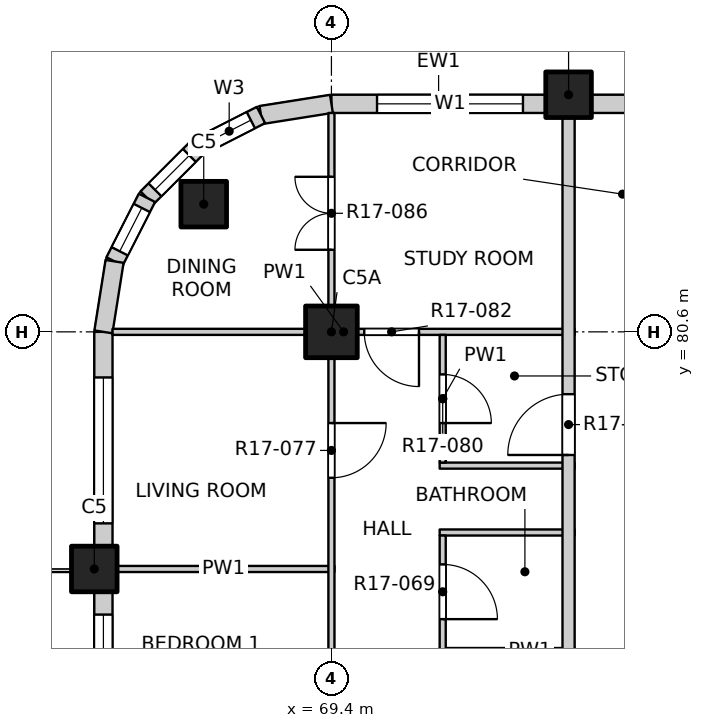
"""IFC4 building model, lengths in metres.
Left out: names, types, materials, properties, quantities, classifications, styles, units other than length and angle.
Written with IfcOpenShell. Run it as: python <this file> out.ifc"""

import sys

from ifc_helpers import new_model, si_unit, direction, frame, frame_2d, origin, origin_2d, place, context, subcontext, project, spatial, rectangle, extrude, element, fill, save


model = new_model("IFC4")
c1 = context("Model", 3, precision=1e-05, world=origin(), true_north=direction((0.0, 1.0)))
c2 = subcontext(c1, "Body", "Model", "MODEL_VIEW")
j1 = project(units=[si_unit("LENGTHUNIT", "METRE"), si_unit("PLANEANGLEUNIT", "RADIAN")], contexts=[c1])
p1 = place(None, origin())
s1 = spatial("IfcSite", under=j1, at=p1, CompositionType="ELEMENT")
p2 = place(p1, origin())
s2 = spatial("IfcBuilding", under=s1, at=p2, CompositionType="ELEMENT")
p3 = place(p2, frame((0.0, 0.0, 182.6)))
s3 = spatial("IfcBuildingStorey", under=s2, at=p3, CompositionType="ELEMENT", Elevation=182.6)
for number, where, z_axis, x_axis in (
    (1, (67.3, 82.7, -0.25), (0.0, 0.0, 1.0), (1.0, 0.0, 0.0)),
    (2, (73.3, 84.5, -0.25), (0.0, 0.0, 1.0), (1.0, 0.0, 0.0)),
    (3, (65.5, 76.7, -0.25), (0.0, 0.0, 1.0), (1.0, 0.0, 0.0)),
):
    element("IfcColumn", number, at=place(p3, frame(where, z_axis=z_axis, x_axis=x_axis)), inside=s3, PredefinedType="COLUMN", context=c2, shape_type="SweptSolid", body=[
        extrude(rectangle(XDim=0.75, YDim=0.75, at=origin_2d()), origin(), (0.0, 0.0, 1.0), 3.4),
    ])
p4 = place(p3, frame((69.4, 80.6, -0.25), z_axis=(0.0, 0.0, 1.0), x_axis=(1.0, 0.0, 0.0)))
e4 = element("IfcColumn", 4, at=p4, inside=s3, PredefinedType="COLUMN", context=c2, shape_type="SweptSolid", body=[
    extrude(rectangle(XDim=0.85, YDim=0.85, at=origin_2d()), origin(), (0.0, 0.0, 1.0), 3.4),
])
p5 = place(p3, frame((69.4, 84.35, 0.0), z_axis=(0.0, 0.0, 1.0), x_axis=(1.0, 0.0, 0.0)))
e5 = element("IfcWall", 5, at=p5, inside=s3, PredefinedType="SOLIDWALL", context=c2, shape_type="SweptSolid", body=[
    extrude(rectangle(XDim=3.525, YDim=0.3, at=frame_2d((1.763, 0.0))), origin(), (0.0, 0.0, 1.0), 2.7),
])
p6 = place(p5, frame((0.75, 0.0, 0.9)))
e6 = element("IfcOpeningElement", 6, at=p6, cuts=e5, PredefinedType="OPENING", context=c2, shape_type="SweptSolid", body=[
    extrude(rectangle(XDim=2.4, YDim=1.8, at=frame_2d((1.2, 0.9))), frame((0.0, 0.16, 0.0), z_axis=(0.0, -1.0, 0.0), x_axis=(1.0, 0.0, 0.0)), (0.0, 0.0, 1.0), 0.32),
])
p7 = place(p3, frame((73.675, 84.35, 0.0), z_axis=(0.0, 0.0, 1.0), x_axis=(1.0, 0.0, 0.0)))
e7 = element("IfcWall", 7, at=p7, inside=s3, PredefinedType="SOLIDWALL", context=c2, shape_type="SweptSolid", body=[
    extrude(rectangle(XDim=1.3, YDim=0.3, at=frame_2d((0.65, 0.0))), origin(), (0.0, 0.0, 1.0), 2.7),
])
p8 = place(p3, frame((65.65, 69.275, 0.0), z_axis=(0.0, 0.0, 1.0), x_axis=(0.0, 1.0, 0.0)))
e8 = element("IfcWall", 8, at=p8, inside=s3, PredefinedType="SOLIDWALL", context=c2, shape_type="SweptSolid", body=[
    extrude(rectangle(XDim=7.05, YDim=0.3, at=frame_2d((3.525, 0.0))), origin(), (0.0, 0.0, 1.0), 2.7),
])
p9 = place(p8, frame((0.675, 0.0, 0.0)))
e9 = element("IfcOpeningElement", 9, at=p9, cuts=e8, PredefinedType="OPENING", context=c2, shape_type="SweptSolid", body=[
    extrude(rectangle(XDim=1.8, YDim=2.4, at=frame_2d((0.9, 1.2))), frame((0.0, 0.16, 0.0), z_axis=(0.0, -1.0, 0.0), x_axis=(1.0, 0.0, 0.0)), (0.0, 0.0, 1.0), 0.32),
])
p10 = place(p8, frame((4.275, 0.0, 0.9)))
e10 = element("IfcOpeningElement", 10, at=p10, cuts=e8, PredefinedType="OPENING", context=c2, shape_type="SweptSolid", body=[
    extrude(rectangle(XDim=2.4, YDim=1.8, at=frame_2d((1.2, 0.9))), frame((0.0, 0.16, 0.0), z_axis=(0.0, -1.0, 0.0), x_axis=(1.0, 0.0, 0.0)), (0.0, 0.0, 1.0), 0.32),
])
p11 = place(p3, frame((65.65, 77.075, 0.0), z_axis=(0.0, 0.0, 1.0), x_axis=(0.0, 1.0, 0.0)))
e11 = element("IfcWall", 11, at=p11, inside=s3, PredefinedType="SOLIDWALL", context=c2, shape_type="SweptSolid", body=[
    extrude(rectangle(XDim=3.525, YDim=0.3, at=frame_2d((1.763, 0.0))), origin(), (0.0, 0.0, 1.0), 2.7),
])
p12 = place(p11, frame((0.375, 0.0, 0.9)))
e12 = element("IfcOpeningElement", 12, at=p12, cuts=e11, PredefinedType="OPENING", context=c2, shape_type="SweptSolid", body=[
    extrude(rectangle(XDim=2.4, YDim=1.8, at=frame_2d((1.2, 0.9))), frame((0.0, 0.16, 0.0), z_axis=(0.0, -1.0, 0.0), x_axis=(1.0, 0.0, 0.0)), (0.0, 0.0, 1.0), 0.32),
])
p13 = place(p3, frame((69.4, 84.35, 0.0), z_axis=(0.0, 0.0, 1.0), x_axis=(-0.987678452879, -0.156496880861, 0.0)))
e13 = element("IfcWall", 13, at=p13, inside=s3, PredefinedType="SOLIDWALL", context=c2, shape_type="SweptSolid", body=[
    extrude(rectangle(XDim=1.173, YDim=0.3, at=frame_2d((0.586, 0.0))), origin(), (0.0, 0.0, 1.0), 2.7),
])
p14 = place(p3, frame((68.241, 84.167, 0.0), z_axis=(0.0, 0.0, 1.0), x_axis=(-0.890988677504, -0.454025524128, 0.0)))
e14 = element("IfcWall", 14, at=p14, inside=s3, PredefinedType="SOLIDWALL", context=c2, shape_type="SweptSolid", body=[
    extrude(rectangle(XDim=1.173, YDim=0.3, at=frame_2d((0.587, 0.0))), origin(), (0.0, 0.0, 1.0), 2.7),
])
p15 = place(p14, frame((0.187, 0.0, 0.9)))
e15 = element("IfcOpeningElement", 15, at=p15, cuts=e14, PredefinedType="OPENING", context=c2, shape_type="SweptSolid", body=[
    extrude(rectangle(XDim=0.8, YDim=1.2, at=frame_2d((0.4, 0.6))), frame((0.0, 0.16, 0.0), z_axis=(0.0, -1.0, 0.0), x_axis=(1.0, 0.0, 0.0)), (0.0, 0.0, 1.0), 0.32),
])
p16 = place(p3, frame((67.196, 83.634, 0.0), z_axis=(0.0, 0.0, 1.0), x_axis=(-0.707106781187, -0.707106781187, 0.0)))
e16 = element("IfcWall", 16, at=p16, inside=s3, PredefinedType="SOLIDWALL", context=c2, shape_type="SweptSolid", body=[
    extrude(rectangle(XDim=1.173, YDim=0.3, at=frame_2d((0.586, 0.0))), origin(), (0.0, 0.0, 1.0), 2.7),
])
p17 = place(p16, frame((0.187, 0.0, 0.9)))
e17 = element("IfcOpeningElement", 17, at=p17, cuts=e16, PredefinedType="OPENING", context=c2, shape_type="SweptSolid", body=[
    extrude(rectangle(XDim=0.8, YDim=1.2, at=frame_2d((0.4, 0.6))), frame((0.0, 0.16, 0.0), z_axis=(0.0, -1.0, 0.0), x_axis=(1.0, 0.0, 0.0)), (0.0, 0.0, 1.0), 0.32),
])
p18 = place(p3, frame((66.366, 82.804, 0.0), z_axis=(0.0, 0.0, 1.0), x_axis=(-0.454025524128, -0.890988677504, 0.0)))
e18 = element("IfcWall", 18, at=p18, inside=s3, PredefinedType="SOLIDWALL", context=c2, shape_type="SweptSolid", body=[
    extrude(rectangle(XDim=1.173, YDim=0.3, at=frame_2d((0.587, 0.0))), origin(), (0.0, 0.0, 1.0), 2.7),
])
p19 = place(p18, frame((0.187, 0.0, 0.9)))
e19 = element("IfcOpeningElement", 19, at=p19, cuts=e18, PredefinedType="OPENING", context=c2, shape_type="SweptSolid", body=[
    extrude(rectangle(XDim=0.8, YDim=1.2, at=frame_2d((0.4, 0.6))), frame((0.0, 0.16, 0.0), z_axis=(0.0, -1.0, 0.0), x_axis=(1.0, 0.0, 0.0)), (0.0, 0.0, 1.0), 0.32),
])
p20 = place(p3, frame((65.833, 81.759, 0.0), z_axis=(0.0, 0.0, 1.0), x_axis=(-0.156496880861, -0.987678452879, 0.0)))
e20 = element("IfcWall", 20, at=p20, inside=s3, PredefinedType="SOLIDWALL", context=c2, shape_type="SweptSolid", body=[
    extrude(rectangle(XDim=1.173, YDim=0.3, at=frame_2d((0.586, 0.0))), origin(), (0.0, 0.0, 1.0), 2.7),
])
p21 = place(p3, frame((71.18, 75.35, 0.0), z_axis=(0.0, 0.0, 1.0), x_axis=(1.0, 0.0, 0.0)))
e21 = element("IfcWall", 21, at=p21, inside=s3, PredefinedType="PARTITIONING", context=c2, shape_type="SweptSolid", body=[
    extrude(rectangle(XDim=2.22, YDim=0.1, at=frame_2d((1.11, 0.0))), origin(), (0.0, 0.0, 1.0), 3.15),
])
p22 = place(p3, frame((65.8, 76.7, 0.0), z_axis=(0.0, 0.0, 1.0), x_axis=(1.0, 0.0, 0.0)))
e22 = element("IfcWall", 22, at=p22, inside=s3, PredefinedType="PARTITIONING", context=c2, shape_type="SweptSolid", body=[
    extrude(rectangle(XDim=3.65, YDim=0.1, at=frame_2d((1.825, 0.0))), origin(), (0.0, 0.0, 1.0), 2.55),
])
for number, where, z_axis, x_axis in (
    (23, (71.18, 77.3, 0.0), (0.0, 0.0, 1.0), (1.0, 0.0, 0.0)),
    (24, (71.18, 78.4, 0.0), (0.0, 0.0, 1.0), (1.0, 0.0, 0.0)),
):
    element("IfcWall", number, at=place(p3, frame(where, z_axis=z_axis, x_axis=x_axis)), inside=s3, PredefinedType="PARTITIONING", context=c2, shape_type="SweptSolid", body=[
        extrude(rectangle(XDim=2.22, YDim=0.1, at=frame_2d((1.11, 0.0))), origin(), (0.0, 0.0, 1.0), 3.15),
    ])
p23 = place(p3, frame((65.8, 80.6, 0.0), z_axis=(0.0, 0.0, 1.0), x_axis=(1.0, 0.0, 0.0)))
e25 = element("IfcWall", 25, at=p23, inside=s3, PredefinedType="PARTITIONING", context=c2, shape_type="SweptSolid", body=[
    extrude(rectangle(XDim=7.6, YDim=0.1, at=frame_2d((3.8, 0.0))), origin(), (0.0, 0.0, 1.0), 3.15),
])
p24 = place(p23, frame((4.14, 0.0, 0.0)))
e26 = element("IfcOpeningElement", 26, at=p24, cuts=e25, PredefinedType="OPENING", context=c2, shape_type="SweptSolid", body=[
    extrude(rectangle(XDim=0.9, YDim=2.1, at=frame_2d((0.45, 1.05))), frame((0.0, 0.06, 0.0), z_axis=(0.0, -1.0, 0.0), x_axis=(1.0, 0.0, 0.0)), (0.0, 0.0, 1.0), 0.12),
])
p25 = place(p3, frame((69.4, 45.8, 0.0), z_axis=(0.0, 0.0, 1.0), x_axis=(0.0, 1.0, 0.0)))
e27 = element("IfcWall", 27, at=p25, inside=s3, PredefinedType="PARTITIONING", context=c2, shape_type="SweptSolid", body=[
    extrude(rectangle(XDim=38.4, YDim=0.1, at=frame_2d((19.2, 0.0))), origin(), (0.0, 0.0, 1.0), 3.15),
])
p26 = place(p25, frame((1.05, 0.0, 0.0)))
e28 = element("IfcOpeningElement", 28, at=p26, cuts=e27, PredefinedType="OPENING", context=c2, shape_type="SweptSolid", body=[
    extrude(rectangle(XDim=1.2, YDim=2.1, at=frame_2d((0.6, 1.05))), frame((0.0, 0.06, 0.0), z_axis=(0.0, -1.0, 0.0), x_axis=(1.0, 0.0, 0.0)), (0.0, 0.0, 1.0), 0.12),
])
p27 = place(p25, frame((6.9, 0.0, 0.0)))
e29 = element("IfcOpeningElement", 29, at=p27, cuts=e27, PredefinedType="OPENING", context=c2, shape_type="SweptSolid", body=[
    extrude(rectangle(XDim=1.2, YDim=2.1, at=frame_2d((0.6, 1.05))), frame((0.0, 0.06, 0.0), z_axis=(0.0, -1.0, 0.0), x_axis=(1.0, 0.0, 0.0)), (0.0, 0.0, 1.0), 0.12),
])
p28 = place(p25, frame((12.9, 0.0, 0.0)))
e30 = element("IfcOpeningElement", 30, at=p28, cuts=e27, PredefinedType="OPENING", context=c2, shape_type="SweptSolid", body=[
    extrude(rectangle(XDim=0.9, YDim=2.1, at=frame_2d((0.45, 1.05))), frame((0.0, 0.06, 0.0), z_axis=(0.0, -1.0, 0.0), x_axis=(1.0, 0.0, 0.0)), (0.0, 0.0, 1.0), 0.12),
])
p29 = place(p25, frame((16.8, 0.0, 0.0)))
e31 = element("IfcOpeningElement", 31, at=p29, cuts=e27, PredefinedType="OPENING", context=c2, shape_type="SweptSolid", body=[
    extrude(rectangle(XDim=0.9, YDim=2.1, at=frame_2d((0.45, 1.05))), frame((0.0, 0.06, 0.0), z_axis=(0.0, -1.0, 0.0), x_axis=(1.0, 0.0, 0.0)), (0.0, 0.0, 1.0), 0.12),
])
p30 = place(p25, frame((20.7, 0.0, 0.0)))
e32 = element("IfcOpeningElement", 32, at=p30, cuts=e27, PredefinedType="OPENING", context=c2, shape_type="SweptSolid", body=[
    extrude(rectangle(XDim=0.9, YDim=2.1, at=frame_2d((0.45, 1.05))), frame((0.0, 0.06, 0.0), z_axis=(0.0, -1.0, 0.0), x_axis=(1.0, 0.0, 0.0)), (0.0, 0.0, 1.0), 0.12),
])
p31 = place(p25, frame((24.6, 0.0, 0.0)))
e33 = element("IfcOpeningElement", 33, at=p31, cuts=e27, PredefinedType="OPENING", context=c2, shape_type="SweptSolid", body=[
    extrude(rectangle(XDim=0.9, YDim=2.1, at=frame_2d((0.45, 1.05))), frame((0.0, 0.06, 0.0), z_axis=(0.0, -1.0, 0.0), x_axis=(1.0, 0.0, 0.0)), (0.0, 0.0, 1.0), 0.12),
])
p32 = place(p25, frame((28.5, 0.0, 0.0)))
e34 = element("IfcOpeningElement", 34, at=p32, cuts=e27, PredefinedType="OPENING", context=c2, shape_type="SweptSolid", body=[
    extrude(rectangle(XDim=0.9, YDim=2.1, at=frame_2d((0.45, 1.05))), frame((0.0, 0.06, 0.0), z_axis=(0.0, -1.0, 0.0), x_axis=(1.0, 0.0, 0.0)), (0.0, 0.0, 1.0), 0.12),
])
p33 = place(p25, frame((32.4, 0.0, 0.0)))
e35 = element("IfcOpeningElement", 35, at=p33, cuts=e27, PredefinedType="OPENING", context=c2, shape_type="SweptSolid", body=[
    extrude(rectangle(XDim=0.9, YDim=2.1, at=frame_2d((0.45, 1.05))), frame((0.0, 0.06, 0.0), z_axis=(0.0, -1.0, 0.0), x_axis=(1.0, 0.0, 0.0)), (0.0, 0.0, 1.0), 0.12),
])
p34 = place(p25, frame((36.15, 0.0, 0.0)))
e36 = element("IfcOpeningElement", 36, at=p34, cuts=e27, PredefinedType="OPENING", context=c2, shape_type="SweptSolid", body=[
    extrude(rectangle(XDim=1.2, YDim=2.1, at=frame_2d((0.6, 1.05))), frame((0.0, 0.06, 0.0), z_axis=(0.0, -1.0, 0.0), x_axis=(1.0, 0.0, 0.0)), (0.0, 0.0, 1.0), 0.12),
])
p35 = place(p3, frame((71.23, 68.2, 0.0), z_axis=(0.0, 0.0, 1.0), x_axis=(0.0, 1.0, 0.0)))
e37 = element("IfcWall", 37, at=p35, inside=s3, PredefinedType="PARTITIONING", context=c2, shape_type="SweptSolid", body=[
    extrude(rectangle(XDim=9.05, YDim=0.1, at=frame_2d((4.525, 0.0))), origin(), (0.0, 0.0, 1.0), 3.15),
])
p36 = place(p35, frame((0.55, 0.0, 0.0)))
e38 = element("IfcOpeningElement", 38, at=p36, cuts=e37, PredefinedType="OPENING", context=c2, shape_type="SweptSolid", body=[
    extrude(rectangle(XDim=0.8, YDim=2.1, at=frame_2d((0.4, 1.05))), frame((0.0, 0.06, 0.0), z_axis=(0.0, -1.0, 0.0), x_axis=(1.0, 0.0, 0.0)), (0.0, 0.0, 1.0), 0.12),
])
p37 = place(p35, frame((2.825, 0.0, 0.0)))
e39 = element("IfcOpeningElement", 39, at=p37, cuts=e37, PredefinedType="OPENING", context=c2, shape_type="SweptSolid", body=[
    extrude(rectangle(XDim=0.9, YDim=2.1, at=frame_2d((0.45, 1.05))), frame((0.0, 0.06, 0.0), z_axis=(0.0, -1.0, 0.0), x_axis=(1.0, 0.0, 0.0)), (0.0, 0.0, 1.0), 0.12),
])
p38 = place(p35, frame((5.425, 0.0, 0.0)))
e40 = element("IfcOpeningElement", 40, at=p38, cuts=e37, PredefinedType="OPENING", context=c2, shape_type="SweptSolid", body=[
    extrude(rectangle(XDim=0.9, YDim=2.1, at=frame_2d((0.45, 1.05))), frame((0.0, 0.06, 0.0), z_axis=(0.0, -1.0, 0.0), x_axis=(1.0, 0.0, 0.0)), (0.0, 0.0, 1.0), 0.12),
])
p39 = place(p35, frame((7.675, 0.0, 0.0)))
e41 = element("IfcOpeningElement", 41, at=p39, cuts=e37, PredefinedType="OPENING", context=c2, shape_type="SweptSolid", body=[
    extrude(rectangle(XDim=0.9, YDim=2.1, at=frame_2d((0.45, 1.05))), frame((0.0, 0.06, 0.0), z_axis=(0.0, -1.0, 0.0), x_axis=(1.0, 0.0, 0.0)), (0.0, 0.0, 1.0), 0.12),
])
p40 = place(p3, frame((71.23, 78.45, 0.0), z_axis=(0.0, 0.0, 1.0), x_axis=(0.0, 1.0, 0.0)))
e42 = element("IfcWall", 42, at=p40, inside=s3, PredefinedType="PARTITIONING", context=c2, shape_type="SweptSolid", body=[
    extrude(rectangle(XDim=2.1, YDim=0.1, at=frame_2d((1.05, 0.0))), origin(), (0.0, 0.0, 1.0), 3.15),
])
p41 = place(p40, frame((0.65, 0.0, 0.0)))
e43 = element("IfcOpeningElement", 43, at=p41, cuts=e42, PredefinedType="OPENING", context=c2, shape_type="SweptSolid", body=[
    extrude(rectangle(XDim=0.8, YDim=2.1, at=frame_2d((0.4, 1.05))), frame((0.0, 0.06, 0.0), z_axis=(0.0, -1.0, 0.0), x_axis=(1.0, 0.0, 0.0)), (0.0, 0.0, 1.0), 0.12),
])
p42 = place(p3, frame((73.3, 49.5, 0.0), z_axis=(0.0, 0.0, 1.0), x_axis=(0.0, 1.0, 0.0)))
e44 = element("IfcWall", 44, at=p42, inside=s3, PredefinedType="PARTITIONING", context=c2, shape_type="SweptSolid", body=[
    extrude(rectangle(XDim=34.7, YDim=0.2, at=frame_2d((17.35, 0.0))), origin(), (0.0, 0.0, 1.0), 3.15),
])
p43 = place(p42, frame((10.575, 0.0, 0.0)))
e45 = element("IfcOpeningElement", 45, at=p43, cuts=e44, PredefinedType="OPENING", context=c2, shape_type="SweptSolid", body=[
    extrude(rectangle(XDim=1.0, YDim=2.1, at=frame_2d((0.5, 1.05))), frame((0.0, 0.11, 0.0), z_axis=(0.0, -1.0, 0.0), x_axis=(1.0, 0.0, 0.0)), (0.0, 0.0, 1.0), 0.22),
])
p44 = place(p42, frame((18.825, 0.0, 0.0)))
e46 = element("IfcOpeningElement", 46, at=p44, cuts=e44, PredefinedType="OPENING", context=c2, shape_type="SweptSolid", body=[
    extrude(rectangle(XDim=1.0, YDim=2.1, at=frame_2d((0.5, 1.05))), frame((0.0, 0.11, 0.0), z_axis=(0.0, -1.0, 0.0), x_axis=(1.0, 0.0, 0.0)), (0.0, 0.0, 1.0), 0.22),
])
p45 = place(p42, frame((29.075, 0.0, 0.0)))
e47 = element("IfcOpeningElement", 47, at=p45, cuts=e44, PredefinedType="OPENING", context=c2, shape_type="SweptSolid", body=[
    extrude(rectangle(XDim=1.0, YDim=2.1, at=frame_2d((0.5, 1.05))), frame((0.0, 0.11, 0.0), z_axis=(0.0, -1.0, 0.0), x_axis=(1.0, 0.0, 0.0)), (0.0, 0.0, 1.0), 0.22),
])
p46 = place(p6, origin())
e48 = element("IfcWindow", 48, at=p46, inside=s3, PartitioningType="DOUBLE_PANEL_VERTICAL", PredefinedType="WINDOW", context=c2, shape_type="SweptSolid", body=[
    extrude(rectangle(XDim=2.4, YDim=1.8, at=frame_2d((1.2, 0.9))), frame((0.0, 0.03, 0.0), z_axis=(0.0, -1.0, 0.0), x_axis=(1.0, 0.0, 0.0)), (0.0, 0.0, 1.0), 0.06),
])
fill(e6, e48)
p47 = place(p10, origin())
e49 = element("IfcWindow", 49, at=p47, inside=s3, PartitioningType="DOUBLE_PANEL_VERTICAL", PredefinedType="WINDOW", context=c2, shape_type="SweptSolid", body=[
    extrude(rectangle(XDim=2.4, YDim=1.8, at=frame_2d((1.2, 0.9))), frame((0.0, 0.03, 0.0), z_axis=(0.0, -1.0, 0.0), x_axis=(1.0, 0.0, 0.0)), (0.0, 0.0, 1.0), 0.06),
])
fill(e10, e49)
p48 = place(p12, origin())
e50 = element("IfcWindow", 50, at=p48, inside=s3, PartitioningType="DOUBLE_PANEL_VERTICAL", PredefinedType="WINDOW", context=c2, shape_type="SweptSolid", body=[
    extrude(rectangle(XDim=2.4, YDim=1.8, at=frame_2d((1.2, 0.9))), frame((0.0, 0.03, 0.0), z_axis=(0.0, -1.0, 0.0), x_axis=(1.0, 0.0, 0.0)), (0.0, 0.0, 1.0), 0.06),
])
fill(e12, e50)
p49 = place(p15, origin())
e51 = element("IfcWindow", 51, at=p49, inside=s3, PartitioningType="SINGLE_PANEL", PredefinedType="WINDOW", context=c2, shape_type="SweptSolid", body=[
    extrude(rectangle(XDim=0.8, YDim=1.2, at=frame_2d((0.4, 0.6))), frame((0.0, 0.03, 0.0), z_axis=(0.0, -1.0, 0.0), x_axis=(1.0, 0.0, 0.0)), (0.0, 0.0, 1.0), 0.06),
])
fill(e15, e51)
p50 = place(p17, origin())
e52 = element("IfcWindow", 52, at=p50, inside=s3, PartitioningType="SINGLE_PANEL", PredefinedType="WINDOW", context=c2, shape_type="SweptSolid", body=[
    extrude(rectangle(XDim=0.8, YDim=1.2, at=frame_2d((0.4, 0.6))), frame((0.0, 0.03, 0.0), z_axis=(0.0, -1.0, 0.0), x_axis=(1.0, 0.0, 0.0)), (0.0, 0.0, 1.0), 0.06),
])
fill(e17, e52)
p51 = place(p19, origin())
e53 = element("IfcWindow", 53, at=p51, inside=s3, PartitioningType="SINGLE_PANEL", PredefinedType="WINDOW", context=c2, shape_type="SweptSolid", body=[
    extrude(rectangle(XDim=0.8, YDim=1.2, at=frame_2d((0.4, 0.6))), frame((0.0, 0.03, 0.0), z_axis=(0.0, -1.0, 0.0), x_axis=(1.0, 0.0, 0.0)), (0.0, 0.0, 1.0), 0.06),
])
fill(e19, e53)
p52 = place(p39, origin())
e54 = element("IfcDoor", 54, at=p52, inside=s3, OperationType="SINGLE_SWING_RIGHT", PredefinedType="DOOR", context=c2, shape_type="SweptSolid", body=[
    extrude(rectangle(XDim=0.9, YDim=2.1, at=frame_2d((0.45, 1.05))), frame((0.0, 0.025, 0.0), z_axis=(0.0, -1.0, 0.0), x_axis=(1.0, 0.0, 0.0)), (0.0, 0.0, 1.0), 0.05),
])
fill(e41, e54)
p53 = place(p33, origin())
e55 = element("IfcDoor", 55, at=p53, inside=s3, OperationType="SINGLE_SWING_LEFT", PredefinedType="DOOR", context=c2, shape_type="SweptSolid", body=[
    extrude(rectangle(XDim=0.9, YDim=2.1, at=frame_2d((0.45, 1.05))), frame((0.0, 0.025, 0.0), z_axis=(0.0, -1.0, 0.0), x_axis=(1.0, 0.0, 0.0)), (0.0, 0.0, 1.0), 0.05),
])
fill(e35, e55)
p54 = place(p45, origin())
e56 = element("IfcDoor", 56, at=p54, inside=s3, OperationType="SINGLE_SWING_RIGHT", PredefinedType="DOOR", context=c2, shape_type="SweptSolid", body=[
    extrude(rectangle(XDim=1.0, YDim=2.1, at=frame_2d((0.5, 1.05))), frame((0.0, 0.025, 0.0), z_axis=(0.0, -1.0, 0.0), x_axis=(1.0, 0.0, 0.0)), (0.0, 0.0, 1.0), 0.05),
])
fill(e47, e56)
p55 = place(p41, origin())
e57 = element("IfcDoor", 57, at=p55, inside=s3, OperationType="SINGLE_SWING_RIGHT", PredefinedType="DOOR", context=c2, shape_type="SweptSolid", body=[
    extrude(rectangle(XDim=0.8, YDim=2.1, at=frame_2d((0.4, 1.05))), frame((0.0, 0.025, 0.0), z_axis=(0.0, -1.0, 0.0), x_axis=(1.0, 0.0, 0.0)), (0.0, 0.0, 1.0), 0.05),
])
fill(e43, e57)
p56 = place(p24, origin())
e58 = element("IfcDoor", 58, at=p56, inside=s3, OperationType="SINGLE_SWING_LEFT", PredefinedType="DOOR", context=c2, shape_type="SweptSolid", body=[
    extrude(rectangle(XDim=0.9, YDim=2.1, at=frame_2d((0.45, 1.05))), frame((0.0, 0.025, 0.0), z_axis=(0.0, -1.0, 0.0), x_axis=(1.0, 0.0, 0.0)), (0.0, 0.0, 1.0), 0.05),
])
fill(e26, e58)
p57 = place(p34, origin())
e59 = element("IfcDoor", 59, at=p57, inside=s3, OperationType="DOUBLE_DOOR_SINGLE_SWING", PredefinedType="DOOR", context=c2, shape_type="SweptSolid", body=[
    extrude(rectangle(XDim=1.2, YDim=2.1, at=frame_2d((0.6, 1.05))), frame((0.0, 0.025, 0.0), z_axis=(0.0, -1.0, 0.0), x_axis=(1.0, 0.0, 0.0)), (0.0, 0.0, 1.0), 0.05),
])
fill(e36, e59)
save(model, sys.argv[1])
